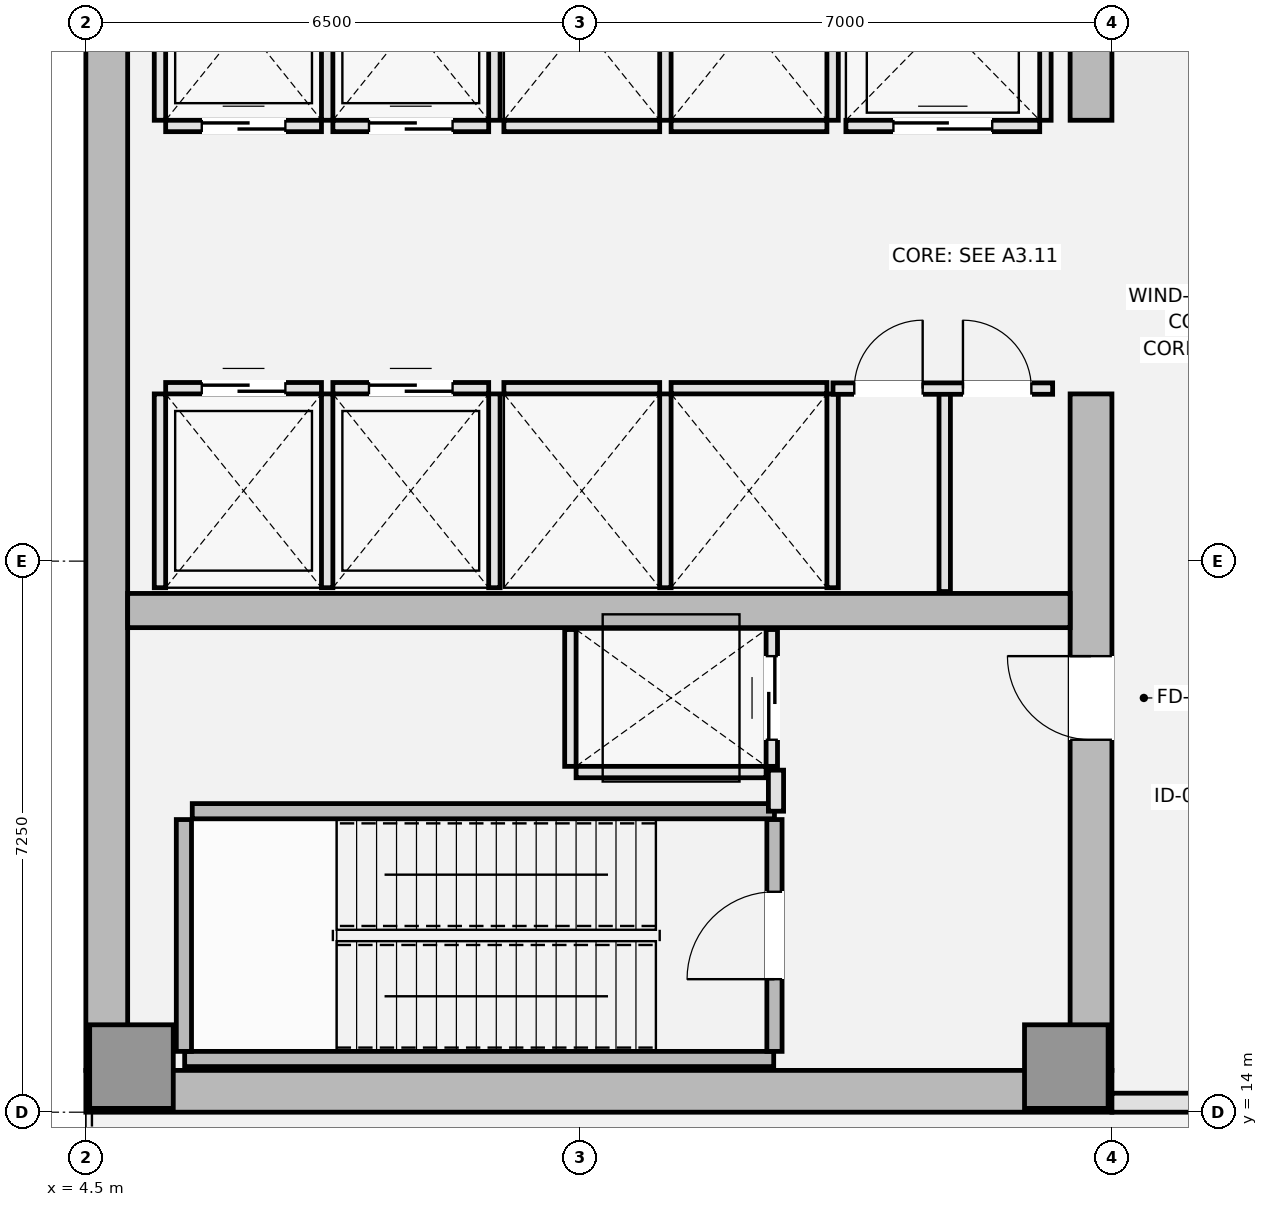
"""IFC4 building model, lengths in metres.
Left out: names, types, materials, properties, quantities, classifications, styles, units other than length and angle.
Written with IfcOpenShell. Run it as: python <this file> out.ifc"""

import sys

from ifc_helpers import new_model, si_unit, direction, frame, frame_2d, origin, origin_2d, place, context, subcontext, project, spatial, rectangle, extrude, element, fill, save


model = new_model("IFC4")
c1 = context("Model", 3, precision=1e-05, world=origin(), true_north=direction((0.0, 1.0)))
c2 = subcontext(c1, "Body", "Model", "MODEL_VIEW")
j1 = project(units=[si_unit("LENGTHUNIT", "METRE"), si_unit("PLANEANGLEUNIT", "RADIAN")], contexts=[c1])
p1 = place(None, origin())
s1 = spatial("IfcSite", under=j1, at=p1, CompositionType="ELEMENT")
p2 = place(p1, origin())
s2 = spatial("IfcBuilding", under=s1, at=p2, CompositionType="ELEMENT")
p3 = place(p2, frame((0.0, 0.0, 178.05)))
s3 = spatial("IfcBuildingStorey", under=s2, at=p3, CompositionType="ELEMENT", Elevation=178.05)
p4 = place(p3, frame((4.5, 14.275, 0.0), z_axis=(0.0, 0.0, 1.0), x_axis=(1.0, 0.0, 0.0)))
e1 = element("IfcWall", 1, at=p4, inside=s3, PredefinedType="SHEAR", context=c2, shape_type="SweptSolid", body=[
    extrude(rectangle(XDim=13.5, YDim=0.55, at=frame_2d((6.75, 0.0))), origin(), (0.0, 0.0, 1.0), 5.6),
])
p5 = place(p3, frame((4.775, 14.55, 0.0), z_axis=(0.0, 0.0, 1.0), x_axis=(0.0, 1.0, 0.0)))
e2 = element("IfcWall", 2, at=p5, inside=s3, PredefinedType="SHEAR", context=c2, shape_type="SweptSolid", body=[
    extrude(rectangle(XDim=21.4, YDim=0.55, at=frame_2d((10.7, 0.0))), origin(), (0.0, 0.0, 1.0), 5.6),
])
p6 = place(p3, frame((17.725, 14.55, 0.0), z_axis=(0.0, 0.0, 1.0), x_axis=(0.0, 1.0, 0.0)))
e3 = element("IfcWall", 3, at=p6, inside=s3, PredefinedType="SHEAR", context=c2, shape_type="SweptSolid", body=[
    extrude(rectangle(XDim=8.9, YDim=0.55, at=frame_2d((4.45, 0.0))), origin(), (0.0, 0.0, 1.0), 5.6),
])
p7 = place(p6, frame((4.35, 0.0, 0.0)))
e4 = element("IfcOpeningElement", 4, at=p7, cuts=e3, PredefinedType="OPENING", context=c2, shape_type="SweptSolid", body=[
    extrude(rectangle(XDim=1.1, YDim=2.15, at=frame_2d((0.55, 1.075))), frame((0.0, 0.285, 0.0), z_axis=(0.0, -1.0, 0.0), x_axis=(1.0, 0.0, 0.0)), (0.0, 0.0, 1.0), 0.57),
])
p8 = place(p3, frame((17.725, 27.05, 0.0), z_axis=(0.0, 0.0, 1.0), x_axis=(0.0, 1.0, 0.0)))
e5 = element("IfcWall", 5, at=p8, inside=s3, PredefinedType="SHEAR", context=c2, shape_type="SweptSolid", body=[
    extrude(rectangle(XDim=8.9, YDim=0.55, at=frame_2d((4.45, 0.0))), origin(), (0.0, 0.0, 1.0), 5.6),
])
p9 = place(p8, frame((3.45, 0.0, 0.0)))
e6 = element("IfcOpeningElement", 6, at=p9, cuts=e5, PredefinedType="OPENING", context=c2, shape_type="SweptSolid", body=[
    extrude(rectangle(XDim=1.1, YDim=2.15, at=frame_2d((0.55, 1.075))), frame((0.0, 0.285, 0.0), z_axis=(0.0, -1.0, 0.0), x_axis=(1.0, 0.0, 0.0)), (0.0, 0.0, 1.0), 0.57),
])
p10 = place(p3, frame((5.05, 20.6, 0.0), z_axis=(0.0, 0.0, 1.0), x_axis=(1.0, 0.0, 0.0)))
e7 = element("IfcWall", 7, at=p10, inside=s3, PredefinedType="SHEAR", context=c2, shape_type="SweptSolid", body=[
    extrude(rectangle(XDim=12.4, YDim=0.45, at=frame_2d((6.2, 0.0))), origin(), (0.0, 0.0, 1.0), 5.6),
])
for number, where, z_axis, x_axis in (
    (8, (5.1, 14.6, 0.0), (0.0, 0.0, 1.0), (1.0, 0.0, 0.0)),
    (9, (17.4, 14.6, 0.0), (0.0, 0.0, 1.0), (1.0, 0.0, 0.0)),
):
    element("IfcColumn", number, at=place(p3, frame(where, z_axis=z_axis, x_axis=x_axis)), inside=s3, PredefinedType="PILASTER", context=c2, shape_type="SweptSolid", body=[
        extrude(rectangle(XDim=1.1, YDim=1.1, at=origin_2d()), origin(), (0.0, 0.0, 1.0), 5.6),
    ])
p11 = place(p3, frame((18.0, 14.125, 0.0), z_axis=(0.0, 0.0, 1.0), x_axis=(1.0, 0.0, 0.0)))
e10 = element("IfcWall", 10, at=p11, inside=s3, PredefinedType="SOLIDWALL", context=c2, shape_type="SweptSolid", body=[
    extrude(rectangle(XDim=6.2, YDim=0.25, at=frame_2d((3.1, 0.0))), origin(), (0.0, 0.0, 1.0), 5.42),
])
p12 = place(p3, frame((5.8, 14.7, 0.0), z_axis=(0.0, 0.0, 1.0), x_axis=(1.0, 0.0, 0.0)))
e11 = element("IfcWall", 11, at=p12, inside=s3, PredefinedType="SOLIDWALL", context=c2, shape_type="SweptSolid", body=[
    extrude(rectangle(XDim=7.75, YDim=0.2, at=frame_2d((3.875, 0.0))), origin(), (0.0, 0.0, 1.0), 5.6),
])
p13 = place(p3, frame((5.79, 14.8, 0.0), z_axis=(0.0, 0.0, 1.0), x_axis=(0.0, 1.0, 0.0)))
e12 = element("IfcWall", 12, at=p13, inside=s3, PredefinedType="SOLIDWALL", context=c2, shape_type="SweptSolid", body=[
    extrude(rectangle(XDim=3.05, YDim=0.2, at=frame_2d((1.525, 0.0))), origin(), (0.0, 0.0, 1.0), 5.6),
])
p14 = place(p3, frame((5.9, 17.96, 0.0), z_axis=(0.0, 0.0, 1.0), x_axis=(1.0, 0.0, 0.0)))
e13 = element("IfcWall", 13, at=p14, inside=s3, PredefinedType="SOLIDWALL", context=c2, shape_type="SweptSolid", body=[
    extrude(rectangle(XDim=7.66, YDim=0.2, at=frame_2d((3.83, 0.0))), origin(), (0.0, 0.0, 1.0), 5.6),
])
p15 = place(p3, frame((13.56, 14.8, 0.0), z_axis=(0.0, 0.0, 1.0), x_axis=(0.0, 1.0, 0.0)))
e14 = element("IfcWall", 14, at=p15, inside=s3, PredefinedType="SOLIDWALL", context=c2, shape_type="SweptSolid", body=[
    extrude(rectangle(XDim=3.05, YDim=0.2, at=frame_2d((1.525, 0.0))), origin(), (0.0, 0.0, 1.0), 5.6),
])
p16 = place(p15, frame((0.95, 0.0, 0.0)))
e15 = element("IfcOpeningElement", 15, at=p16, cuts=e14, PredefinedType="OPENING", context=c2, shape_type="SweptSolid", body=[
    extrude(rectangle(XDim=1.15, YDim=2.15, at=frame_2d((0.575, 1.075))), frame((0.0, 0.11, 0.0), z_axis=(0.0, -1.0, 0.0), x_axis=(1.0, 0.0, 0.0)), (0.0, 0.0, 1.0), 0.22),
])
p17 = place(p3, frame((5.55, 23.525, 0.0), z_axis=(0.0, 0.0, 1.0), x_axis=(1.0, 0.0, 0.0)))
e16 = element("IfcWall", 16, at=p17, inside=s3, PredefinedType="PARTITIONING", context=c2, shape_type="SweptSolid", body=[
    extrude(rectangle(XDim=2.05, YDim=0.15, at=frame_2d((1.025, 0.0))), origin(), (0.0, 0.0, 1.0), 5.42),
])
p18 = place(p17, frame((0.475, 0.0, 0.0)))
e17 = element("IfcOpeningElement", 17, at=p18, cuts=e16, PredefinedType="OPENING", context=c2, shape_type="SweptSolid", body=[
    extrude(rectangle(XDim=1.1, YDim=2.2, at=frame_2d((0.55, 1.1))), frame((0.0, 0.085, 0.0), z_axis=(0.0, -1.0, 0.0), x_axis=(1.0, 0.0, 0.0)), (0.0, 0.0, 1.0), 0.17),
])
for number, where, z_axis, x_axis in (
    (18, (5.475, 20.9, 0.0), (0.0, 0.0, 1.0), (0.0, 1.0, 0.0)),
    (19, (7.675, 20.9, 0.0), (0.0, 0.0, 1.0), (0.0, 1.0, 0.0)),
):
    element("IfcWall", number, at=place(p3, frame(where, z_axis=z_axis, x_axis=x_axis)), inside=s3, PredefinedType="PARTITIONING", context=c2, shape_type="SweptSolid", body=[
        extrude(rectangle(XDim=2.55, YDim=0.15, at=frame_2d((1.275, 0.0))), origin(), (0.0, 0.0, 1.0), 5.42),
    ])
p19 = place(p3, frame((7.75, 23.525, 0.0), z_axis=(0.0, 0.0, 1.0), x_axis=(1.0, 0.0, 0.0)))
e20 = element("IfcWall", 20, at=p19, inside=s3, PredefinedType="PARTITIONING", context=c2, shape_type="SweptSolid", body=[
    extrude(rectangle(XDim=2.05, YDim=0.15, at=frame_2d((1.025, 0.0))), origin(), (0.0, 0.0, 1.0), 5.42),
])
p20 = place(p19, frame((0.475, 0.0, 0.0)))
e21 = element("IfcOpeningElement", 21, at=p20, cuts=e20, PredefinedType="OPENING", context=c2, shape_type="SweptSolid", body=[
    extrude(rectangle(XDim=1.1, YDim=2.2, at=frame_2d((0.55, 1.1))), frame((0.0, 0.085, 0.0), z_axis=(0.0, -1.0, 0.0), x_axis=(1.0, 0.0, 0.0)), (0.0, 0.0, 1.0), 0.17),
])
p21 = place(p3, frame((9.875, 20.9, 0.0), z_axis=(0.0, 0.0, 1.0), x_axis=(0.0, 1.0, 0.0)))
e22 = element("IfcWall", 22, at=p21, inside=s3, PredefinedType="PARTITIONING", context=c2, shape_type="SweptSolid", body=[
    extrude(rectangle(XDim=2.55, YDim=0.15, at=frame_2d((1.275, 0.0))), origin(), (0.0, 0.0, 1.0), 5.42),
])
p22 = place(p3, frame((5.55, 26.975, 0.0), z_axis=(0.0, 0.0, 1.0), x_axis=(1.0, 0.0, 0.0)))
e23 = element("IfcWall", 23, at=p22, inside=s3, PredefinedType="PARTITIONING", context=c2, shape_type="SweptSolid", body=[
    extrude(rectangle(XDim=2.05, YDim=0.15, at=frame_2d((1.025, 0.0))), origin(), (0.0, 0.0, 1.0), 5.42),
])
p23 = place(p22, frame((0.475, 0.0, 0.0)))
e24 = element("IfcOpeningElement", 24, at=p23, cuts=e23, PredefinedType="OPENING", context=c2, shape_type="SweptSolid", body=[
    extrude(rectangle(XDim=1.1, YDim=2.2, at=frame_2d((0.55, 1.1))), frame((0.0, 0.085, 0.0), z_axis=(0.0, -1.0, 0.0), x_axis=(1.0, 0.0, 0.0)), (0.0, 0.0, 1.0), 0.17),
])
for number, where, z_axis, x_axis in (
    (25, (5.475, 27.05, 0.0), (0.0, 0.0, 1.0), (0.0, 1.0, 0.0)),
    (26, (7.675, 27.05, 0.0), (0.0, 0.0, 1.0), (0.0, 1.0, 0.0)),
):
    element("IfcWall", number, at=place(p3, frame(where, z_axis=z_axis, x_axis=x_axis)), inside=s3, PredefinedType="PARTITIONING", context=c2, shape_type="SweptSolid", body=[
        extrude(rectangle(XDim=2.55, YDim=0.15, at=frame_2d((1.275, 0.0))), origin(), (0.0, 0.0, 1.0), 5.42),
    ])
p24 = place(p3, frame((7.75, 26.975, 0.0), z_axis=(0.0, 0.0, 1.0), x_axis=(1.0, 0.0, 0.0)))
e27 = element("IfcWall", 27, at=p24, inside=s3, PredefinedType="PARTITIONING", context=c2, shape_type="SweptSolid", body=[
    extrude(rectangle(XDim=2.05, YDim=0.15, at=frame_2d((1.025, 0.0))), origin(), (0.0, 0.0, 1.0), 5.42),
])
p25 = place(p24, frame((0.475, 0.0, 0.0)))
e28 = element("IfcOpeningElement", 28, at=p25, cuts=e27, PredefinedType="OPENING", context=c2, shape_type="SweptSolid", body=[
    extrude(rectangle(XDim=1.1, YDim=2.2, at=frame_2d((0.55, 1.1))), frame((0.0, 0.085, 0.0), z_axis=(0.0, -1.0, 0.0), x_axis=(1.0, 0.0, 0.0)), (0.0, 0.0, 1.0), 0.17),
])
p26 = place(p3, frame((9.875, 27.05, 0.0), z_axis=(0.0, 0.0, 1.0), x_axis=(0.0, 1.0, 0.0)))
e29 = element("IfcWall", 29, at=p26, inside=s3, PredefinedType="PARTITIONING", context=c2, shape_type="SweptSolid", body=[
    extrude(rectangle(XDim=2.55, YDim=0.15, at=frame_2d((1.275, 0.0))), origin(), (0.0, 0.0, 1.0), 5.42),
])
p27 = place(p3, frame((10.0, 23.525, 0.0), z_axis=(0.0, 0.0, 1.0), x_axis=(1.0, 0.0, 0.0)))
e30 = element("IfcWall", 30, at=p27, inside=s3, PredefinedType="PARTITIONING", context=c2, shape_type="SweptSolid", body=[
    extrude(rectangle(XDim=2.05, YDim=0.15, at=frame_2d((1.025, 0.0))), origin(), (0.0, 0.0, 1.0), 5.42),
])
p28 = place(p3, frame((12.125, 20.9, 0.0), z_axis=(0.0, 0.0, 1.0), x_axis=(0.0, 1.0, 0.0)))
e31 = element("IfcWall", 31, at=p28, inside=s3, PredefinedType="PARTITIONING", context=c2, shape_type="SweptSolid", body=[
    extrude(rectangle(XDim=2.55, YDim=0.15, at=frame_2d((1.275, 0.0))), origin(), (0.0, 0.0, 1.0), 5.42),
])
p29 = place(p3, frame((12.2, 23.525, 0.0), z_axis=(0.0, 0.0, 1.0), x_axis=(1.0, 0.0, 0.0)))
e32 = element("IfcWall", 32, at=p29, inside=s3, PredefinedType="PARTITIONING", context=c2, shape_type="SweptSolid", body=[
    extrude(rectangle(XDim=2.05, YDim=0.15, at=frame_2d((1.025, 0.0))), origin(), (0.0, 0.0, 1.0), 5.42),
])
p30 = place(p3, frame((14.325, 20.9, 0.0), z_axis=(0.0, 0.0, 1.0), x_axis=(0.0, 1.0, 0.0)))
e33 = element("IfcWall", 33, at=p30, inside=s3, PredefinedType="PARTITIONING", context=c2, shape_type="SweptSolid", body=[
    extrude(rectangle(XDim=2.55, YDim=0.15, at=frame_2d((1.275, 0.0))), origin(), (0.0, 0.0, 1.0), 5.42),
])
p31 = place(p3, frame((10.0, 26.975, 0.0), z_axis=(0.0, 0.0, 1.0), x_axis=(1.0, 0.0, 0.0)))
e34 = element("IfcWall", 34, at=p31, inside=s3, PredefinedType="PARTITIONING", context=c2, shape_type="SweptSolid", body=[
    extrude(rectangle(XDim=2.05, YDim=0.15, at=frame_2d((1.025, 0.0))), origin(), (0.0, 0.0, 1.0), 5.42),
])
p32 = place(p3, frame((12.125, 27.05, 0.0), z_axis=(0.0, 0.0, 1.0), x_axis=(0.0, 1.0, 0.0)))
e35 = element("IfcWall", 35, at=p32, inside=s3, PredefinedType="PARTITIONING", context=c2, shape_type="SweptSolid", body=[
    extrude(rectangle(XDim=2.55, YDim=0.15, at=frame_2d((1.275, 0.0))), origin(), (0.0, 0.0, 1.0), 5.42),
])
p33 = place(p3, frame((12.2, 26.975, 0.0), z_axis=(0.0, 0.0, 1.0), x_axis=(1.0, 0.0, 0.0)))
e36 = element("IfcWall", 36, at=p33, inside=s3, PredefinedType="PARTITIONING", context=c2, shape_type="SweptSolid", body=[
    extrude(rectangle(XDim=2.05, YDim=0.15, at=frame_2d((1.025, 0.0))), origin(), (0.0, 0.0, 1.0), 5.42),
])
p34 = place(p3, frame((14.325, 27.05, 0.0), z_axis=(0.0, 0.0, 1.0), x_axis=(0.0, 1.0, 0.0)))
e37 = element("IfcWall", 37, at=p34, inside=s3, PredefinedType="PARTITIONING", context=c2, shape_type="SweptSolid", body=[
    extrude(rectangle(XDim=2.55, YDim=0.15, at=frame_2d((1.275, 0.0))), origin(), (0.0, 0.0, 1.0), 5.42),
])
p35 = place(p3, frame((14.5, 26.975, 0.0), z_axis=(0.0, 0.0, 1.0), x_axis=(1.0, 0.0, 0.0)))
e38 = element("IfcWall", 38, at=p35, inside=s3, PredefinedType="PARTITIONING", context=c2, shape_type="SweptSolid", body=[
    extrude(rectangle(XDim=2.55, YDim=0.15, at=frame_2d((1.275, 0.0))), origin(), (0.0, 0.0, 1.0), 5.42),
])
p36 = place(p35, frame((0.625, 0.0, 0.0)))
e39 = element("IfcOpeningElement", 39, at=p36, cuts=e38, PredefinedType="OPENING", context=c2, shape_type="SweptSolid", body=[
    extrude(rectangle(XDim=1.3, YDim=2.2, at=frame_2d((0.65, 1.1))), frame((0.0, 0.085, 0.0), z_axis=(0.0, -1.0, 0.0), x_axis=(1.0, 0.0, 0.0)), (0.0, 0.0, 1.0), 0.17),
])
p37 = place(p3, frame((17.125, 27.05, 0.0), z_axis=(0.0, 0.0, 1.0), x_axis=(0.0, 1.0, 0.0)))
e40 = element("IfcWall", 40, at=p37, inside=s3, PredefinedType="PARTITIONING", context=c2, shape_type="SweptSolid", body=[
    extrude(rectangle(XDim=2.6, YDim=0.15, at=frame_2d((1.3, 0.0))), origin(), (0.0, 0.0, 1.0), 5.42),
])
p38 = place(p3, frame((10.95, 18.475, 0.0), z_axis=(0.0, 0.0, 1.0), x_axis=(1.0, 0.0, 0.0)))
e41 = element("IfcWall", 41, at=p38, inside=s3, PredefinedType="PARTITIONING", context=c2, shape_type="SweptSolid", body=[
    extrude(rectangle(XDim=2.5, YDim=0.15, at=frame_2d((1.25, 0.0))), origin(), (0.0, 0.0, 1.0), 5.42),
])
p39 = place(p3, frame((10.875, 18.55, 0.0), z_axis=(0.0, 0.0, 1.0), x_axis=(0.0, 1.0, 0.0)))
e42 = element("IfcWall", 42, at=p39, inside=s3, PredefinedType="PARTITIONING", context=c2, shape_type="SweptSolid", body=[
    extrude(rectangle(XDim=1.8, YDim=0.15, at=frame_2d((0.9, 0.0))), origin(), (0.0, 0.0, 1.0), 5.42),
])
p40 = place(p3, frame((13.525, 18.55, 0.0), z_axis=(0.0, 0.0, 1.0), x_axis=(0.0, 1.0, 0.0)))
e43 = element("IfcWall", 43, at=p40, inside=s3, PredefinedType="PARTITIONING", context=c2, shape_type="SweptSolid", body=[
    extrude(rectangle(XDim=1.8, YDim=0.15, at=frame_2d((0.9, 0.0))), origin(), (0.0, 0.0, 1.0), 5.42),
])
p41 = place(p40, frame((0.35, 0.0, 0.0)))
e44 = element("IfcOpeningElement", 44, at=p41, cuts=e43, PredefinedType="OPENING", context=c2, shape_type="SweptSolid", body=[
    extrude(rectangle(XDim=1.1, YDim=2.2, at=frame_2d((0.55, 1.1))), frame((0.0, 0.085, 0.0), z_axis=(0.0, -1.0, 0.0), x_axis=(1.0, 0.0, 0.0)), (0.0, 0.0, 1.0), 0.17),
])
p42 = place(p3, frame((13.58, 17.96, 0.0), z_axis=(0.0, 0.0, 1.0), x_axis=(0.0, 1.0, 0.0)))
e45 = element("IfcWall", 45, at=p42, inside=s3, PredefinedType="PARTITIONING", context=c2, shape_type="SweptSolid", body=[
    extrude(rectangle(XDim=0.54, YDim=0.2, at=frame_2d((0.27, 0.0))), origin(), (0.0, 0.0, 1.0), 5.42),
])
p43 = place(p3, frame((15.8, 20.85, 0.0), z_axis=(0.0, 0.0, 1.0), x_axis=(0.0, 1.0, 0.0)))
e46 = element("IfcWall", 46, at=p43, inside=s3, PredefinedType="PARTITIONING", context=c2, shape_type="SweptSolid", body=[
    extrude(rectangle(XDim=2.67, YDim=0.15, at=frame_2d((1.335, 0.0))), origin(), (0.0, 0.0, 1.0), 5.42),
])
p44 = place(p3, frame((14.33, 23.52, 0.0), z_axis=(0.0, 0.0, 1.0), x_axis=(1.0, 0.0, 0.0)))
e47 = element("IfcWall", 47, at=p44, inside=s3, PredefinedType="PARTITIONING", context=c2, shape_type="SweptSolid", body=[
    extrude(rectangle(XDim=2.89, YDim=0.15, at=frame_2d((1.445, 0.0))), origin(), (0.0, 0.0, 1.0), 5.42),
])
p45 = place(p44, frame((0.28, 0.0, 0.0)))
e48 = element("IfcOpeningElement", 48, at=p45, cuts=e47, PredefinedType="OPENING", context=c2, shape_type="SweptSolid", body=[
    extrude(rectangle(XDim=0.9, YDim=2.1, at=frame_2d((0.45, 1.05))), frame((0.0, 0.085, 0.0), z_axis=(0.0, -1.0, 0.0), x_axis=(1.0, 0.0, 0.0)), (0.0, 0.0, 1.0), 0.17),
])
p46 = place(p44, frame((1.71, 0.0, 0.0)))
e49 = element("IfcOpeningElement", 49, at=p46, cuts=e47, PredefinedType="OPENING", context=c2, shape_type="SweptSolid", body=[
    extrude(rectangle(XDim=0.9, YDim=2.1, at=frame_2d((0.45, 1.05))), frame((0.0, 0.085, 0.0), z_axis=(0.0, -1.0, 0.0), x_axis=(1.0, 0.0, 0.0)), (0.0, 0.0, 1.0), 0.17),
])
p47 = place(p16, origin())
e50 = element("IfcDoor", 50, at=p47, inside=s3, OperationType="SINGLE_SWING_LEFT", PredefinedType="DOOR", context=c2, shape_type="SweptSolid", body=[
    extrude(rectangle(XDim=1.15, YDim=2.15, at=frame_2d((0.575, 1.075))), frame((0.0, 0.025, 0.0), z_axis=(0.0, -1.0, 0.0), x_axis=(1.0, 0.0, 0.0)), (0.0, 0.0, 1.0), 0.05),
])
fill(e15, e50)
p48 = place(p18, origin())
e51 = element("IfcDoor", 51, at=p48, inside=s3, OperationType="DOUBLE_DOOR_SLIDING", PredefinedType="DOOR", context=c2, shape_type="SweptSolid", body=[
    extrude(rectangle(XDim=1.1, YDim=2.2, at=frame_2d((0.55, 1.1))), frame((0.0, 0.025, 0.0), z_axis=(0.0, -1.0, 0.0), x_axis=(1.0, 0.0, 0.0)), (0.0, 0.0, 1.0), 0.05),
])
fill(e17, e51)
p49 = place(p20, origin())
e52 = element("IfcDoor", 52, at=p49, inside=s3, OperationType="DOUBLE_DOOR_SLIDING", PredefinedType="DOOR", context=c2, shape_type="SweptSolid", body=[
    extrude(rectangle(XDim=1.1, YDim=2.2, at=frame_2d((0.55, 1.1))), frame((0.0, 0.025, 0.0), z_axis=(0.0, -1.0, 0.0), x_axis=(1.0, 0.0, 0.0)), (0.0, 0.0, 1.0), 0.05),
])
fill(e21, e52)
p50 = place(p23, origin())
e53 = element("IfcDoor", 53, at=p50, inside=s3, OperationType="DOUBLE_DOOR_SLIDING", PredefinedType="DOOR", context=c2, shape_type="SweptSolid", body=[
    extrude(rectangle(XDim=1.1, YDim=2.2, at=frame_2d((0.55, 1.1))), frame((0.0, 0.025, 0.0), z_axis=(0.0, -1.0, 0.0), x_axis=(1.0, 0.0, 0.0)), (0.0, 0.0, 1.0), 0.05),
])
fill(e24, e53)
p51 = place(p25, origin())
e54 = element("IfcDoor", 54, at=p51, inside=s3, OperationType="DOUBLE_DOOR_SLIDING", PredefinedType="DOOR", context=c2, shape_type="SweptSolid", body=[
    extrude(rectangle(XDim=1.1, YDim=2.2, at=frame_2d((0.55, 1.1))), frame((0.0, 0.025, 0.0), z_axis=(0.0, -1.0, 0.0), x_axis=(1.0, 0.0, 0.0)), (0.0, 0.0, 1.0), 0.05),
])
fill(e28, e54)
p52 = place(p36, origin())
e55 = element("IfcDoor", 55, at=p52, inside=s3, OperationType="DOUBLE_DOOR_SLIDING", PredefinedType="DOOR", context=c2, shape_type="SweptSolid", body=[
    extrude(rectangle(XDim=1.3, YDim=2.2, at=frame_2d((0.65, 1.1))), frame((0.0, 0.025, 0.0), z_axis=(0.0, -1.0, 0.0), x_axis=(1.0, 0.0, 0.0)), (0.0, 0.0, 1.0), 0.05),
])
fill(e39, e55)
p53 = place(p41, origin())
e56 = element("IfcDoor", 56, at=p53, inside=s3, OperationType="DOUBLE_DOOR_SLIDING", PredefinedType="DOOR", context=c2, shape_type="SweptSolid", body=[
    extrude(rectangle(XDim=1.1, YDim=2.2, at=frame_2d((0.55, 1.1))), frame((0.0, 0.025, 0.0), z_axis=(0.0, -1.0, 0.0), x_axis=(1.0, 0.0, 0.0)), (0.0, 0.0, 1.0), 0.05),
])
fill(e44, e56)
p54 = place(p7, origin())
e57 = element("IfcDoor", 57, at=p54, inside=s3, OperationType="SINGLE_SWING_RIGHT", PredefinedType="DOOR", context=c2, shape_type="SweptSolid", body=[
    extrude(rectangle(XDim=1.1, YDim=2.15, at=frame_2d((0.55, 1.075))), frame((0.0, 0.025, 0.0), z_axis=(0.0, -1.0, 0.0), x_axis=(1.0, 0.0, 0.0)), (0.0, 0.0, 1.0), 0.05),
])
fill(e4, e57)
p55 = place(p45, origin())
e58 = element("IfcDoor", 58, at=p55, inside=s3, OperationType="SINGLE_SWING_RIGHT", PredefinedType="DOOR", context=c2, shape_type="SweptSolid", body=[
    extrude(rectangle(XDim=0.9, YDim=2.1, at=frame_2d((0.45, 1.05))), frame((0.0, 0.025, 0.0), z_axis=(0.0, -1.0, 0.0), x_axis=(1.0, 0.0, 0.0)), (0.0, 0.0, 1.0), 0.05),
])
fill(e48, e58)
p56 = place(p46, origin())
e59 = element("IfcDoor", 59, at=p56, inside=s3, OperationType="SINGLE_SWING_LEFT", PredefinedType="DOOR", context=c2, shape_type="SweptSolid", body=[
    extrude(rectangle(XDim=0.9, YDim=2.1, at=frame_2d((0.45, 1.05))), frame((0.0, 0.025, 0.0), z_axis=(0.0, -1.0, 0.0), x_axis=(1.0, 0.0, 0.0)), (0.0, 0.0, 1.0), 0.05),
])
fill(e49, e59)
save(model, sys.argv[1])
